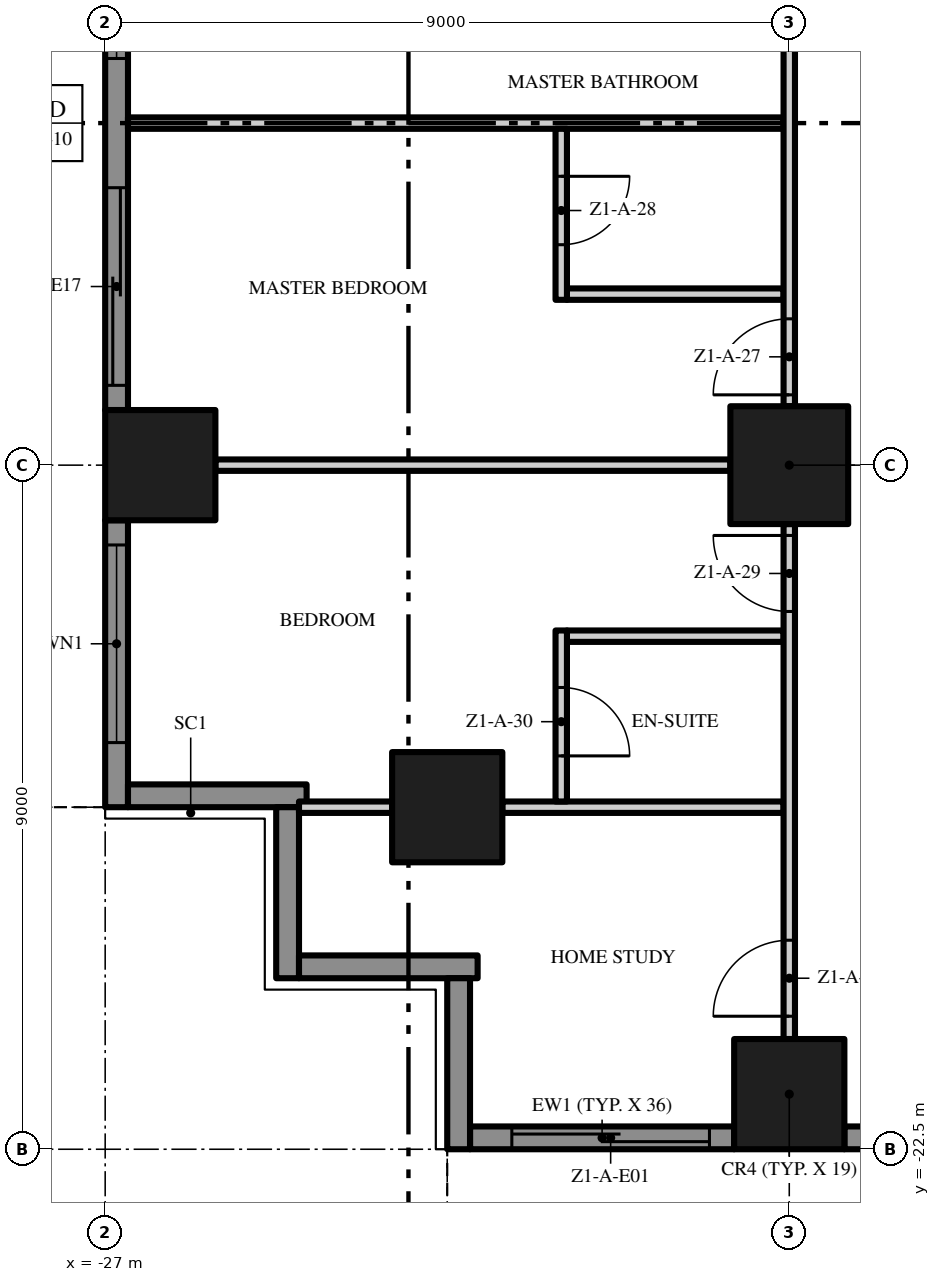
"""IFC4 building model, lengths in metres.
Left out: names, types, materials, properties, quantities, classifications, styles, units other than length and angle.
Written with IfcOpenShell. Run it as: python <this file> out.ifc"""

import sys

from ifc_helpers import new_model, si_unit, direction, frame, frame_2d, origin, origin_2d, place, context, subcontext, project, spatial, polyline, rectangle, outline, extrude, element, fill, save


model = new_model("IFC4")
c1 = context("Model", 3, precision=1e-05, world=origin(), true_north=direction((0.0, 1.0)))
c2 = subcontext(c1, "Body", "Model", "MODEL_VIEW")
j1 = project(units=[si_unit("LENGTHUNIT", "METRE"), si_unit("PLANEANGLEUNIT", "RADIAN")], contexts=[c1])
p1 = place(None, origin())
s1 = spatial("IfcSite", under=j1, at=p1, CompositionType="ELEMENT")
p2 = place(p1, origin())
s2 = spatial("IfcBuilding", under=s1, at=p2, CompositionType="ELEMENT")
p3 = place(p2, frame((0.0, 0.0, 22.6)))
s3 = spatial("IfcBuildingStorey", under=s2, at=p3, CompositionType="ELEMENT", Elevation=22.6)
p4 = place(p3, frame((-18.0, -13.5, 0.0), z_axis=(0.0, 0.0, 1.0), x_axis=(1.0, 0.0, 0.0)))
e1 = element("IfcColumn", 1, at=p4, inside=s3, PredefinedType="COLUMN", context=c2, shape_type="SweptSolid", body=[
    extrude(rectangle(XDim=1.55, YDim=1.55, at=origin_2d()), origin(), (0.0, 0.0, 1.0), 3.5),
])
for number, where, z_axis, x_axis in (
    (2, (-18.0, -21.775, 0.0), (0.0, 0.0, 1.0), (1.0, 0.0, 0.0)),
    (3, (-26.275, -13.5, 0.0), (0.0, 0.0, 1.0), (1.0, 0.0, 0.0)),
    (4, (-22.5, -18.0, 0.0), (0.0, 0.0, 1.0), (1.0, 0.0, 0.0)),
):
    element("IfcColumn", number, at=place(p3, frame(where, z_axis=z_axis, x_axis=x_axis)), inside=s3, PredefinedType="COLUMN", context=c2, shape_type="SweptSolid", body=[
        extrude(rectangle(XDim=1.45, YDim=1.45, at=origin_2d()), origin(), (0.0, 0.0, 1.0), 3.5),
    ])
p5 = place(p3, frame((-18.725, -22.35, 0.0), z_axis=(0.0, 0.0, 1.0), x_axis=(-1.0, 0.0, 0.0)))
e5 = element("IfcWall", 5, at=p5, inside=s3, PredefinedType="SOLIDWALL", context=c2, shape_type="SweptSolid", body=[
    extrude(rectangle(XDim=3.475, YDim=0.3, at=frame_2d((1.738, 0.0))), origin(), (0.0, 0.0, 1.0), 3.5),
])
p6 = place(p5, frame((0.325, 0.0, 0.0)))
e6 = element("IfcOpeningElement", 6, at=p6, cuts=e5, PredefinedType="OPENING", context=c2, shape_type="SweptSolid", body=[
    extrude(rectangle(XDim=2.6, YDim=2.4, at=frame_2d((1.3, 1.2))), frame((0.0, 0.16, 0.0), z_axis=(0.0, -1.0, 0.0), x_axis=(1.0, 0.0, 0.0)), (0.0, 0.0, 1.0), 0.32),
])
p7 = place(p3, frame((-9.725, -22.35, 0.0), z_axis=(0.0, 0.0, 1.0), x_axis=(-1.0, 0.0, 0.0)))
e7 = element("IfcWall", 7, at=p7, inside=s3, PredefinedType="SOLIDWALL", context=c2, shape_type="SweptSolid", body=[
    extrude(rectangle(XDim=7.55, YDim=0.3, at=frame_2d((3.775, 0.0))), origin(), (0.0, 0.0, 1.0), 3.5),
])
p8 = place(p7, frame((4.625, 0.0, 0.45)))
e8 = element("IfcOpeningElement", 8, at=p8, cuts=e7, PredefinedType="OPENING", context=c2, shape_type="SweptSolid", body=[
    extrude(rectangle(XDim=2.6, YDim=2.65, at=frame_2d((1.3, 1.325))), frame((0.0, 0.16, 0.0), z_axis=(0.0, -1.0, 0.0), x_axis=(1.0, 0.0, 0.0)), (0.0, 0.0, 1.0), 0.32),
])
p9 = place(p7, frame((0.325, 0.0, 0.45)))
e9 = element("IfcOpeningElement", 9, at=p9, cuts=e7, PredefinedType="OPENING", context=c2, shape_type="SweptSolid", body=[
    extrude(rectangle(XDim=2.6, YDim=2.65, at=frame_2d((1.3, 1.325))), frame((0.0, 0.16, 0.0), z_axis=(0.0, -1.0, 0.0), x_axis=(1.0, 0.0, 0.0)), (0.0, 0.0, 1.0), 0.32),
])
p10 = place(p3, frame((-26.85, -12.775, 0.0), z_axis=(0.0, 0.0, 1.0), x_axis=(0.0, 1.0, 0.0)))
e10 = element("IfcWall", 10, at=p10, inside=s3, PredefinedType="SOLIDWALL", context=c2, shape_type="SweptSolid", body=[
    extrude(rectangle(XDim=7.55, YDim=0.3, at=frame_2d((3.775, 0.0))), origin(), (0.0, 0.0, 1.0), 3.5),
])
p11 = place(p10, frame((4.625, 0.0, 0.45)))
e11 = element("IfcOpeningElement", 11, at=p11, cuts=e10, PredefinedType="OPENING", context=c2, shape_type="SweptSolid", body=[
    extrude(rectangle(XDim=2.6, YDim=2.65, at=frame_2d((1.3, 1.325))), frame((0.0, 0.16, 0.0), z_axis=(0.0, -1.0, 0.0), x_axis=(1.0, 0.0, 0.0)), (0.0, 0.0, 1.0), 0.32),
])
p12 = place(p10, frame((0.325, 0.0, 0.0)))
e12 = element("IfcOpeningElement", 12, at=p12, cuts=e10, PredefinedType="OPENING", context=c2, shape_type="SweptSolid", body=[
    extrude(rectangle(XDim=2.6, YDim=2.4, at=frame_2d((1.3, 1.2))), frame((0.0, 0.16, 0.0), z_axis=(0.0, -1.0, 0.0), x_axis=(1.0, 0.0, 0.0)), (0.0, 0.0, 1.0), 0.32),
])
p13 = place(p3, frame((-26.85, -18.0, 0.0), z_axis=(0.0, 0.0, 1.0), x_axis=(0.0, 1.0, 0.0)))
e13 = element("IfcWall", 13, at=p13, inside=s3, PredefinedType="SOLIDWALL", context=c2, shape_type="SweptSolid", body=[
    extrude(rectangle(XDim=3.775, YDim=0.3, at=frame_2d((1.887, 0.0))), origin(), (0.0, 0.0, 1.0), 3.5),
])
p14 = place(p13, frame((0.85, 0.0, 0.45)))
e14 = element("IfcOpeningElement", 14, at=p14, cuts=e13, PredefinedType="OPENING", context=c2, shape_type="SweptSolid", body=[
    extrude(rectangle(XDim=2.6, YDim=2.65, at=frame_2d((1.3, 1.325))), frame((0.0, 0.16, 0.0), z_axis=(0.0, -1.0, 0.0), x_axis=(1.0, 0.0, 0.0)), (0.0, 0.0, 1.0), 0.32),
])
p15 = place(p3, frame((-24.35, -17.85, 0.0), z_axis=(0.0, 0.0, 1.0), x_axis=(-1.0, 0.0, 0.0)))
e15 = element("IfcWall", 15, at=p15, inside=s3, PredefinedType="SOLIDWALL", context=c2, shape_type="SweptSolid", body=[
    extrude(rectangle(XDim=2.35, YDim=0.3, at=frame_2d((1.175, 0.0))), origin(), (0.0, 0.0, 1.0), 3.5),
])
p16 = place(p3, frame((-24.6, -20.25, 0.0), z_axis=(0.0, 0.0, 1.0), x_axis=(0.0, 1.0, 0.0)))
e16 = element("IfcWall", 16, at=p16, inside=s3, PredefinedType="SOLIDWALL", context=c2, shape_type="SweptSolid", body=[
    extrude(rectangle(XDim=2.25, YDim=0.3, at=frame_2d((1.125, 0.0))), origin(), (0.0, 0.0, 1.0), 3.5),
])
p17 = place(p3, frame((-22.1, -20.1, 0.0), z_axis=(0.0, 0.0, 1.0), x_axis=(-1.0, 0.0, 0.0)))
e17 = element("IfcWall", 17, at=p17, inside=s3, PredefinedType="SOLIDWALL", context=c2, shape_type="SweptSolid", body=[
    extrude(rectangle(XDim=2.35, YDim=0.3, at=frame_2d((1.175, 0.0))), origin(), (0.0, 0.0, 1.0), 3.5),
])
p18 = place(p3, frame((-22.35, -22.5, 0.0), z_axis=(0.0, 0.0, 1.0), x_axis=(0.0, 1.0, 0.0)))
e18 = element("IfcWall", 18, at=p18, inside=s3, PredefinedType="SOLIDWALL", context=c2, shape_type="SweptSolid", body=[
    extrude(rectangle(XDim=2.25, YDim=0.3, at=frame_2d((1.125, 0.0))), origin(), (0.0, 0.0, 1.0), 3.5),
])
p19 = place(p3, origin())
e19 = element("IfcWall", 19, at=p19, inside=s3, PredefinedType="USERDEFINED", context=c2, shape_type="SweptSolid", body=[
    extrude(outline(polyline([(-22.5, -25.5), (-21.0, -25.271), (-19.5, -24.671), (-18.0, -23.929), (-16.5, -23.329), (-15.0, -23.1), (-13.5, -23.329), (-12.0, -23.929), (-10.5, -24.671), (-9.0, -25.271), (-7.5, -25.5), (-6.0, -25.271), (-4.5, -24.671), (-3.0, -23.929), (-1.5, -23.329), (0.0, -23.1), (1.5, -23.329), (3.0, -23.929), (4.5, -24.671), (6.0, -25.271), (7.5, -25.5), (9.0, -25.271), (10.5, -24.671), (12.0, -23.929), (13.5, -23.329), (15.0, -23.1), (16.5, -23.329), (18.0, -23.929), (19.5, -24.671), (21.0, -25.271), (22.5, -25.5), (22.538, -25.253), (21.066, -25.028), (19.602, -24.442), (18.102, -23.701), (16.566, -23.086), (15.0, -22.847), (13.434, -23.086), (11.898, -23.701), (10.398, -24.442), (8.934, -25.028), (7.5, -25.247), (6.066, -25.028), (4.602, -24.442), (3.102, -23.701), (1.566, -23.086), (0.0, -22.847), (-1.566, -23.086), (-3.102, -23.701), (-4.602, -24.442), (-6.066, -25.028), (-7.5, -25.247), (-8.934, -25.028), (-10.398, -24.442), (-11.898, -23.701), (-13.434, -23.086), (-15.0, -22.847), (-16.566, -23.086), (-18.102, -23.701), (-19.602, -24.442), (-21.066, -25.028), (-22.538, -25.253), (-22.5, -25.5)])), origin(), (0.0, 0.0, 1.0), 0.9),
])
p20 = place(p3, origin())
e20 = element("IfcWall", 20, at=p20, inside=s3, PredefinedType="USERDEFINED", context=c2, shape_type="SweptSolid", body=[
    extrude(outline(polyline([(-30.0, 18.0), (-29.771, 16.5), (-29.171, 15.0), (-28.429, 13.5), (-27.829, 12.0), (-27.6, 10.5), (-27.829, 9.0), (-28.429, 7.5), (-29.171, 6.0), (-29.771, 4.5), (-30.0, 3.0), (-29.771, 1.5), (-29.171, 0.0), (-28.429, -1.5), (-27.829, -3.0), (-27.6, -4.5), (-27.829, -6.0), (-28.429, -7.5), (-29.171, -9.0), (-29.771, -10.5), (-30.0, -12.0), (-29.771, -13.5), (-29.171, -15.0), (-28.429, -16.5), (-27.829, -18.0), (-27.597, -17.907), (-28.201, -16.398), (-28.942, -14.898), (-29.528, -13.434), (-29.747, -12.0), (-29.528, -10.566), (-28.942, -9.102), (-28.201, -7.602), (-27.586, -6.066), (-27.347, -4.5), (-27.586, -2.934), (-28.201, -1.398), (-28.942, 0.102), (-29.528, 1.566), (-29.747, 3.0), (-29.528, 4.434), (-28.942, 5.898), (-28.201, 7.398), (-27.586, 8.934), (-27.347, 10.5), (-27.586, 12.066), (-28.201, 13.602), (-28.942, 15.102), (-29.528, 16.566), (-29.753, 18.038), (-30.0, 18.0)])), origin(), (0.0, 0.0, 1.0), 0.9),
])
p21 = place(p3, frame((-24.45, -18.0, 0.0), z_axis=(0.0, 0.0, 1.0), x_axis=(1.0, 0.0, 0.0)))
e21 = element("IfcWall", 21, at=p21, inside=s3, PredefinedType="PARTITIONING", context=c2, shape_type="SweptSolid", body=[
    extrude(rectangle(XDim=1.225, YDim=0.15, at=frame_2d((0.613, 0.0))), origin(), (0.0, 0.0, 1.0), 3.5),
])
p22 = place(p3, frame((-21.775, -18.0, 0.0), z_axis=(0.0, 0.0, 1.0), x_axis=(1.0, 0.0, 0.0)))
e22 = element("IfcWall", 22, at=p22, inside=s3, PredefinedType="PARTITIONING", context=c2, shape_type="SweptSolid", body=[
    extrude(rectangle(XDim=3.7, YDim=0.15, at=frame_2d((1.85, 0.0))), origin(), (0.0, 0.0, 1.0), 3.5),
])
p23 = place(p3, frame((-20.925, -15.75, 0.0), z_axis=(0.0, 0.0, 1.0), x_axis=(1.0, 0.0, 0.0)))
e23 = element("IfcWall", 23, at=p23, inside=s3, PredefinedType="PARTITIONING", context=c2, shape_type="SweptSolid", body=[
    extrude(rectangle(XDim=2.85, YDim=0.15, at=frame_2d((1.425, 0.0))), origin(), (0.0, 0.0, 1.0), 3.5),
])
p24 = place(p3, frame((-25.55, -13.5, 0.0), z_axis=(0.0, 0.0, 1.0), x_axis=(1.0, 0.0, 0.0)))
e24 = element("IfcWall", 24, at=p24, inside=s3, PredefinedType="PARTITIONING", context=c2, shape_type="SweptSolid", body=[
    extrude(rectangle(XDim=6.775, YDim=0.15, at=frame_2d((3.388, 0.0))), origin(), (0.0, 0.0, 1.0), 3.5),
])
p25 = place(p3, frame((-20.925, -11.25, 0.0), z_axis=(0.0, 0.0, 1.0), x_axis=(1.0, 0.0, 0.0)))
e25 = element("IfcWall", 25, at=p25, inside=s3, PredefinedType="PARTITIONING", context=c2, shape_type="SweptSolid", body=[
    extrude(rectangle(XDim=2.85, YDim=0.15, at=frame_2d((1.425, 0.0))), origin(), (0.0, 0.0, 1.0), 3.5),
])
p26 = place(p3, frame((-26.7, -9.0, 0.0), z_axis=(0.0, 0.0, 1.0), x_axis=(1.0, 0.0, 0.0)))
e26 = element("IfcWall", 26, at=p26, inside=s3, PredefinedType="PARTITIONING", context=c2, shape_type="SweptSolid", body=[
    extrude(rectangle(XDim=8.625, YDim=0.15, at=frame_2d((4.312, 0.0))), origin(), (0.0, 0.0, 1.0), 3.5),
])
p27 = place(p3, frame((-21.0, -15.675, 0.0), z_axis=(0.0, 0.0, 1.0), x_axis=(0.0, -1.0, 0.0)))
e27 = element("IfcWall", 27, at=p27, inside=s3, PredefinedType="PARTITIONING", context=c2, shape_type="SweptSolid", body=[
    extrude(rectangle(XDim=2.25, YDim=0.15, at=frame_2d((1.125, 0.0))), origin(), (0.0, 0.0, 1.0), 3.5),
])
p28 = place(p27, frame((0.75, 0.0, 0.0)))
e28 = element("IfcOpeningElement", 28, at=p28, cuts=e27, PredefinedType="OPENING", context=c2, shape_type="SweptSolid", body=[
    extrude(rectangle(XDim=0.9, YDim=2.1, at=frame_2d((0.45, 1.05))), frame((0.0, 0.085, 0.0), z_axis=(0.0, -1.0, 0.0), x_axis=(1.0, 0.0, 0.0)), (0.0, 0.0, 1.0), 0.17),
])
p29 = place(p3, frame((-21.0, -9.075, 0.0), z_axis=(0.0, 0.0, 1.0), x_axis=(0.0, -1.0, 0.0)))
e29 = element("IfcWall", 29, at=p29, inside=s3, PredefinedType="PARTITIONING", context=c2, shape_type="SweptSolid", body=[
    extrude(rectangle(XDim=2.25, YDim=0.15, at=frame_2d((1.125, 0.0))), origin(), (0.0, 0.0, 1.0), 3.5),
])
p30 = place(p29, frame((0.625, 0.0, 0.0)))
e30 = element("IfcOpeningElement", 30, at=p30, cuts=e29, PredefinedType="OPENING", context=c2, shape_type="SweptSolid", body=[
    extrude(rectangle(XDim=0.9, YDim=2.1, at=frame_2d((0.45, 1.05))), frame((0.0, 0.085, 0.0), z_axis=(0.0, -1.0, 0.0), x_axis=(1.0, 0.0, 0.0)), (0.0, 0.0, 1.0), 0.17),
])
p31 = place(p3, frame((-18.0, -21.05, 0.0), z_axis=(0.0, 0.0, 1.0), x_axis=(0.0, 1.0, 0.0)))
e31 = element("IfcWall", 31, at=p31, inside=s3, PredefinedType="PARTITIONING", context=c2, shape_type="SweptSolid", body=[
    extrude(rectangle(XDim=6.775, YDim=0.15, at=frame_2d((3.388, 0.0))), origin(), (0.0, 0.0, 1.0), 3.5),
])
p32 = place(p31, frame((5.625, 0.0, 0.0)))
e32 = element("IfcOpeningElement", 32, at=p32, cuts=e31, PredefinedType="OPENING", context=c2, shape_type="SweptSolid", body=[
    extrude(rectangle(XDim=1.0, YDim=2.4, at=frame_2d((0.5, 1.2))), frame((0.0, 0.085, 0.0), z_axis=(0.0, -1.0, 0.0), x_axis=(1.0, 0.0, 0.0)), (0.0, 0.0, 1.0), 0.17),
])
p33 = place(p31, frame((0.3, 0.0, 0.0)))
e33 = element("IfcOpeningElement", 33, at=p33, cuts=e31, PredefinedType="OPENING", context=c2, shape_type="SweptSolid", body=[
    extrude(rectangle(XDim=1.0, YDim=2.4, at=frame_2d((0.5, 1.2))), frame((0.0, 0.085, 0.0), z_axis=(0.0, -1.0, 0.0), x_axis=(1.0, 0.0, 0.0)), (0.0, 0.0, 1.0), 0.17),
])
p34 = place(p3, frame((-18.0, -12.725, 0.0), z_axis=(0.0, 0.0, 1.0), x_axis=(0.0, 1.0, 0.0)))
e34 = element("IfcWall", 34, at=p34, inside=s3, PredefinedType="PARTITIONING", context=c2, shape_type="SweptSolid", body=[
    extrude(rectangle(XDim=7.45, YDim=0.15, at=frame_2d((3.725, 0.0))), origin(), (0.0, 0.0, 1.0), 3.5),
])
p35 = place(p34, frame((5.5, 0.0, 0.0)))
e35 = element("IfcOpeningElement", 35, at=p35, cuts=e34, PredefinedType="OPENING", context=c2, shape_type="SweptSolid", body=[
    extrude(rectangle(XDim=1.8, YDim=2.4, at=frame_2d((0.9, 1.2))), frame((0.0, 0.085, 0.0), z_axis=(0.0, -1.0, 0.0), x_axis=(1.0, 0.0, 0.0)), (0.0, 0.0, 1.0), 0.17),
])
p36 = place(p34, frame((0.15, 0.0, 0.0)))
e36 = element("IfcOpeningElement", 36, at=p36, cuts=e34, PredefinedType="OPENING", context=c2, shape_type="SweptSolid", body=[
    extrude(rectangle(XDim=1.0, YDim=2.4, at=frame_2d((0.5, 1.2))), frame((0.0, 0.085, 0.0), z_axis=(0.0, -1.0, 0.0), x_axis=(1.0, 0.0, 0.0)), (0.0, 0.0, 1.0), 0.17),
])
p37 = place(p6, origin())
e37 = element("IfcDoor", 37, at=p37, inside=s3, OperationType="SINGLE_SWING_LEFT", PredefinedType="DOOR", context=c2, shape_type="SweptSolid", body=[
    extrude(rectangle(XDim=2.6, YDim=2.4, at=frame_2d((1.3, 1.2))), frame((0.0, 0.025, 0.0), z_axis=(0.0, -1.0, 0.0), x_axis=(1.0, 0.0, 0.0)), (0.0, 0.0, 1.0), 0.05),
])
fill(e6, e37)
p38 = place(p11, origin())
e38 = element("IfcWindow", 38, at=p38, inside=s3, PartitioningType="SINGLE_PANEL", PredefinedType="WINDOW", context=c2, shape_type="SweptSolid", body=[
    extrude(rectangle(XDim=2.6, YDim=2.65, at=frame_2d((1.3, 1.325))), frame((0.0, 0.03, 0.0), z_axis=(0.0, -1.0, 0.0), x_axis=(1.0, 0.0, 0.0)), (0.0, 0.0, 1.0), 0.06),
])
fill(e11, e38)
p39 = place(p12, origin())
e39 = element("IfcDoor", 39, at=p39, inside=s3, OperationType="SINGLE_SWING_LEFT", PredefinedType="DOOR", context=c2, shape_type="SweptSolid", body=[
    extrude(rectangle(XDim=2.6, YDim=2.4, at=frame_2d((1.3, 1.2))), frame((0.0, 0.025, 0.0), z_axis=(0.0, -1.0, 0.0), x_axis=(1.0, 0.0, 0.0)), (0.0, 0.0, 1.0), 0.05),
])
fill(e12, e39)
p40 = place(p14, origin())
e40 = element("IfcWindow", 40, at=p40, inside=s3, PartitioningType="SINGLE_PANEL", PredefinedType="WINDOW", context=c2, shape_type="SweptSolid", body=[
    extrude(rectangle(XDim=2.6, YDim=2.65, at=frame_2d((1.3, 1.325))), frame((0.0, 0.03, 0.0), z_axis=(0.0, -1.0, 0.0), x_axis=(1.0, 0.0, 0.0)), (0.0, 0.0, 1.0), 0.06),
])
fill(e14, e40)
p41 = place(p36, origin())
e41 = element("IfcDoor", 41, at=p41, inside=s3, OperationType="SINGLE_SWING_LEFT", PredefinedType="DOOR", context=c2, shape_type="SweptSolid", body=[
    extrude(rectangle(XDim=1.0, YDim=2.4, at=frame_2d((0.5, 1.2))), frame((0.0, 0.025, 0.0), z_axis=(0.0, -1.0, 0.0), x_axis=(1.0, 0.0, 0.0)), (0.0, 0.0, 1.0), 0.05),
])
fill(e36, e41)
p42 = place(p30, origin())
e42 = element("IfcDoor", 42, at=p42, inside=s3, OperationType="SINGLE_SWING_LEFT", PredefinedType="DOOR", context=c2, shape_type="SweptSolid", body=[
    extrude(rectangle(XDim=0.9, YDim=2.1, at=frame_2d((0.45, 1.05))), frame((0.0, 0.025, 0.0), z_axis=(0.0, -1.0, 0.0), x_axis=(1.0, 0.0, 0.0)), (0.0, 0.0, 1.0), 0.05),
])
fill(e30, e42)
p43 = place(p32, origin())
e43 = element("IfcDoor", 43, at=p43, inside=s3, OperationType="SINGLE_SWING_RIGHT", PredefinedType="DOOR", context=c2, shape_type="SweptSolid", body=[
    extrude(rectangle(XDim=1.0, YDim=2.4, at=frame_2d((0.5, 1.2))), frame((0.0, 0.025, 0.0), z_axis=(0.0, -1.0, 0.0), x_axis=(1.0, 0.0, 0.0)), (0.0, 0.0, 1.0), 0.05),
])
fill(e32, e43)
p44 = place(p28, origin())
e44 = element("IfcDoor", 44, at=p44, inside=s3, OperationType="SINGLE_SWING_RIGHT", PredefinedType="DOOR", context=c2, shape_type="SweptSolid", body=[
    extrude(rectangle(XDim=0.9, YDim=2.1, at=frame_2d((0.45, 1.05))), frame((0.0, 0.025, 0.0), z_axis=(0.0, -1.0, 0.0), x_axis=(1.0, 0.0, 0.0)), (0.0, 0.0, 1.0), 0.05),
])
fill(e28, e44)
p45 = place(p33, origin())
e45 = element("IfcDoor", 45, at=p45, inside=s3, OperationType="SINGLE_SWING_LEFT", PredefinedType="DOOR", context=c2, shape_type="SweptSolid", body=[
    extrude(rectangle(XDim=1.0, YDim=2.4, at=frame_2d((0.5, 1.2))), frame((0.0, 0.025, 0.0), z_axis=(0.0, -1.0, 0.0), x_axis=(1.0, 0.0, 0.0)), (0.0, 0.0, 1.0), 0.05),
])
fill(e33, e45)
save(model, sys.argv[1])
